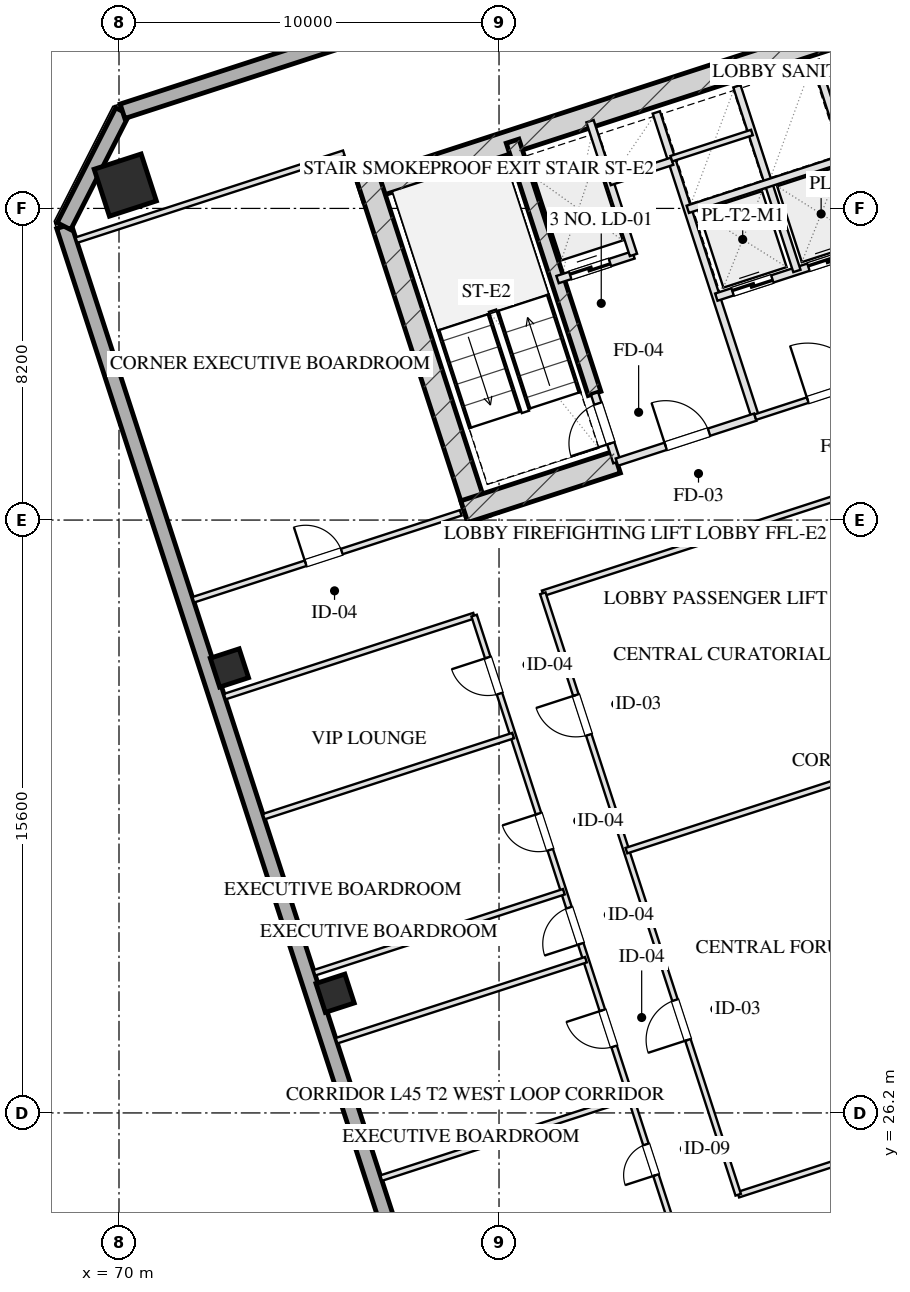
"""IFC4 building model, lengths in metres.
Left out: names, types, materials, properties, quantities, classifications, styles, units other than length and angle.
Written with IfcOpenShell. Run it as: python <this file> out.ifc"""

import sys

from ifc_helpers import new_model, si_unit, direction, frame, frame_2d, origin, origin_2d, place, context, subcontext, project, spatial, rectangle, hollow_rectangle, extrude, element, fill, save


model = new_model("IFC4")
c1 = context("Model", 3, precision=1e-05, world=origin(), true_north=direction((0.0, 1.0)))
c2 = subcontext(c1, "Body", "Model", "MODEL_VIEW")
j1 = project(units=[si_unit("LENGTHUNIT", "METRE"), si_unit("PLANEANGLEUNIT", "RADIAN")], contexts=[c1])
p1 = place(None, origin())
s1 = spatial("IfcSite", under=j1, at=p1, CompositionType="ELEMENT")
p2 = place(p1, origin())
s2 = spatial("IfcBuilding", under=s1, at=p2, CompositionType="ELEMENT")
p3 = place(p2, frame((0.0, 0.0, 170.2)))
s3 = spatial("IfcBuildingStorey", under=s2, at=p3, CompositionType="ELEMENT", Elevation=170.2)
p4 = place(p3, frame((76.344, 50.466, 0.0), z_axis=(0.0, 0.0, 1.0), x_axis=(0.951055727519, 0.309019421968, 0.0)))
e1 = element("IfcWall", 1, at=p4, inside=s3, PredefinedType="SHEAR", context=c2, shape_type="SweptSolid", body=[
    extrude(rectangle(XDim=16.4, YDim=0.6, at=frame_2d((8.2, 0.0))), origin(), (0.0, 0.0, 1.0), 3.45),
])
p5 = place(p3, frame((79.466, 41.828, 0.0), z_axis=(0.0, 0.0, 1.0), x_axis=(-0.309041232772, 0.951048640421, 0.0)))
e2 = element("IfcWall", 2, at=p5, inside=s3, PredefinedType="SHEAR", context=c2, shape_type="SweptSolid", body=[
    extrude(rectangle(XDim=9.48, YDim=0.6, at=frame_2d((4.74, 0.0))), origin(), (0.0, 0.0, 1.0), 3.45),
])
p6 = place(p3, frame((82.514, 45.131, 0.0), z_axis=(0.0, 0.0, 1.0), x_axis=(-0.308988790936, 0.951065679686, 0.0)))
e3 = element("IfcWall", 3, at=p6, inside=s3, PredefinedType="SHEAR", context=c2, shape_type="SweptSolid", body=[
    extrude(rectangle(XDim=6.98, YDim=0.35, at=frame_2d((3.49, 0.0))), origin(), (0.0, 0.0, 1.0), 3.45),
])
p7 = place(p3, frame((79.087, 42.021, 0.0), z_axis=(0.0, 0.0, 1.0), x_axis=(0.951062550203, 0.3089984233, 0.0)))
e4 = element("IfcWall", 4, at=p7, inside=s3, PredefinedType="SHEAR", context=c2, shape_type="SweptSolid", body=[
    extrude(rectangle(XDim=4.22, YDim=0.6, at=frame_2d((2.11, 0.0))), origin(), (0.0, 0.0, 1.0), 3.45),
])
p8 = place(p3, frame((70.165, 50.614, 0.0), z_axis=(0.0, 0.0, 1.0), x_axis=(0.951056516295, 0.309016994375, 0.0)))
e5 = element("IfcColumn", 5, at=p8, inside=s3, PredefinedType="COLUMN", context=c2, shape_type="SweptSolid", body=[
    extrude(hollow_rectangle(XDim=1.3, YDim=1.3, WallThickness=0.045, at=origin_2d()), origin(), (0.0, 0.0, 1.0), 3.451),
])
for number, where, z_axis, x_axis in (
    (6, (75.687, 29.349, 0.0), (0.0, 0.0, 1.0), (0.951, 0.309, 0.0)),
    (7, (72.906, 37.909, 0.0), (0.0, 0.0, 1.0), (0.951, 0.309, 0.0)),
):
    element("IfcColumn", number, at=place(p3, frame(where, z_axis=z_axis, x_axis=x_axis)), inside=s3, PredefinedType="COLUMN", context=c2, shape_type="SweptSolid", body=[
        extrude(hollow_rectangle(XDim=0.8, YDim=0.8, WallThickness=0.028, at=origin_2d()), origin(), (0.0, 0.0, 1.0), 3.451),
    ])
p9 = place(p3, frame((81.776, 8.827, 0.0), z_axis=(0.0, 0.0, 1.0), x_axis=(-0.309014228706, 0.951057414911, 0.0)))
e8 = element("IfcWall", 8, at=p9, inside=s3, PredefinedType="SOLIDWALL", context=c2, shape_type="SweptSolid", body=[
    extrude(rectangle(XDim=42.8, YDim=0.4, at=frame_2d((21.4, 0.0))), origin(), (0.0, 0.0, 1.0), 2.61),
])
p10 = place(p3, frame((68.551, 49.532, 0.0), z_axis=(0.0, 0.0, 1.0), x_axis=(0.454019523198, 0.890991735402, 0.0)))
e9 = element("IfcWall", 9, at=p10, inside=s3, PredefinedType="SOLIDWALL", context=c2, shape_type="SweptSolid", body=[
    extrude(rectangle(XDim=3.394, YDim=0.4, at=frame_2d((1.697, 0.0))), origin(), (0.0, 0.0, 1.0), 2.61),
])
p11 = place(p3, frame((70.092, 52.556, 0.0), z_axis=(0.0, 0.0, 1.0), x_axis=(0.951057580055, 0.30901372044, 0.0)))
e10 = element("IfcWall", 10, at=p11, inside=s3, PredefinedType="SOLIDWALL", context=c2, shape_type="SweptSolid", body=[
    extrude(rectangle(XDim=26.4, YDim=0.4, at=frame_2d((13.2, 0.0))), origin(), (0.0, 0.0, 1.0), 2.61),
])
p12 = place(p3, frame((83.101, 43.324, 0.0), z_axis=(0.0, 0.0, 1.0), x_axis=(-0.309048298632, 0.951046344356, 0.0)))
e11 = element("IfcWall", 11, at=p12, inside=s3, PredefinedType="PARTITIONING", context=c2, shape_type="SweptSolid", body=[
    extrude(rectangle(XDim=1.9, YDim=0.2, at=frame_2d((0.95, 0.0))), origin(), (0.0, 0.0, 1.0), 3.175),
])
p13 = place(p12, frame((0.52, 0.0, 0.0)))
e12 = element("IfcOpeningElement", 12, at=p13, cuts=e11, PredefinedType="OPENING", context=c2, shape_type="SweptSolid", body=[
    extrude(rectangle(XDim=1.1, YDim=2.05, at=frame_2d((0.55, 1.025))), frame((0.0, 0.11, 0.0), z_axis=(0.0, -1.0, 0.0), x_axis=(1.0, 0.0, 0.0)), (0.0, 0.0, 1.0), 0.22),
])
p14 = place(p3, frame((86.743, 44.508, 0.0), z_axis=(0.0, 0.0, 1.0), x_axis=(-0.309016001439, 0.951056838919, 0.0)))
e13 = element("IfcWall", 13, at=p14, inside=s3, PredefinedType="PARTITIONING", context=c2, shape_type="SweptSolid", body=[
    extrude(rectangle(XDim=8.43, YDim=0.2, at=frame_2d((4.215, 0.0))), origin(), (0.0, 0.0, 1.0), 3.175),
])
p15 = place(p3, frame((83.101, 43.324, 0.0), z_axis=(0.0, 0.0, 1.0), x_axis=(0.951052804469, 0.309028417967, 0.0)))
e14 = element("IfcWall", 14, at=p15, inside=s3, PredefinedType="PARTITIONING", context=c2, shape_type="SweptSolid", body=[
    extrude(rectangle(XDim=3.83, YDim=0.2, at=frame_2d((1.915, 0.0))), origin(), (0.0, 0.0, 1.0), 3.175),
])
p16 = place(p15, frame((1.35, 0.0, 0.0)))
e15 = element("IfcOpeningElement", 15, at=p16, cuts=e14, PredefinedType="OPENING", context=c2, shape_type="SweptSolid", body=[
    extrude(rectangle(XDim=1.2, YDim=2.05, at=frame_2d((0.6, 1.025))), frame((0.0, 0.11, 0.0), z_axis=(0.0, -1.0, 0.0), x_axis=(1.0, 0.0, 0.0)), (0.0, 0.0, 1.0), 0.22),
])
p17 = place(p3, frame((81.54, 48.127, 0.0), z_axis=(0.0, 0.0, 1.0), x_axis=(0.951062257173, 0.308999325213, 0.0)))
e16 = element("IfcWall", 16, at=p17, inside=s3, PredefinedType="PARTITIONING", context=c2, shape_type="SweptSolid", body=[
    extrude(rectangle(XDim=2.1, YDim=0.2, at=frame_2d((1.05, 0.0))), origin(), (0.0, 0.0, 1.0), 3.175),
])
p18 = place(p17, frame((0.35, 0.0, 0.0)))
e17 = element("IfcOpeningElement", 17, at=p18, cuts=e16, PredefinedType="OPENING", context=c2, shape_type="SweptSolid", body=[
    extrude(rectangle(XDim=1.1, YDim=2.05, at=frame_2d((0.55, 1.025))), frame((0.0, 0.11, 0.0), z_axis=(0.0, -1.0, 0.0), x_axis=(1.0, 0.0, 0.0)), (0.0, 0.0, 1.0), 0.22),
])
p19 = place(p3, frame((83.538, 48.776, 0.0), z_axis=(0.0, 0.0, 1.0), x_axis=(-0.3089935693, 0.951064127245, 0.0)))
e18 = element("IfcWall", 18, at=p19, inside=s3, PredefinedType="PARTITIONING", context=c2, shape_type="SweptSolid", body=[
    extrude(rectangle(XDim=3.7, YDim=0.2, at=frame_2d((1.85, 0.0))), origin(), (0.0, 0.0, 1.0), 3.175),
])
p20 = place(p3, frame((82.91, 50.707, 0.0), z_axis=(0.0, 0.0, 1.0), x_axis=(0.951041328149, 0.309063734775, 0.0)))
e19 = element("IfcWall", 19, at=p20, inside=s3, PredefinedType="PARTITIONING", context=c2, shape_type="SweptSolid", body=[
    extrude(rectangle(XDim=1.73, YDim=0.2, at=frame_2d((0.865, 0.0))), origin(), (0.0, 0.0, 1.0), 3.175),
])
p21 = place(p3, frame((90.928, 45.868, 0.0), z_axis=(0.0, 0.0, 1.0), x_axis=(-0.309042196757, 0.951048327176, 0.0)))
e20 = element("IfcWall", 20, at=p21, inside=s3, PredefinedType="PARTITIONING", context=c2, shape_type="SweptSolid", body=[
    extrude(rectangle(XDim=8.43, YDim=0.2, at=frame_2d((4.215, 0.0))), origin(), (0.0, 0.0, 1.0), 3.175),
])
p22 = place(p3, frame((86.743, 44.508, 0.0), z_axis=(0.0, 0.0, 1.0), x_axis=(0.951063829732, 0.308994485023, 0.0)))
e21 = element("IfcWall", 21, at=p22, inside=s3, PredefinedType="PARTITIONING", context=c2, shape_type="SweptSolid", body=[
    extrude(rectangle(XDim=4.4, YDim=0.15, at=frame_2d((2.2, 0.0))), origin(), (0.0, 0.0, 1.0), 3.175),
])
p23 = place(p22, frame((1.45, 0.0, 0.0)))
e22 = element("IfcOpeningElement", 22, at=p23, cuts=e21, PredefinedType="OPENING", context=c2, shape_type="SweptSolid", body=[
    extrude(rectangle(XDim=1.5, YDim=2.05, at=frame_2d((0.75, 1.025))), frame((0.0, 0.085, 0.0), z_axis=(0.0, -1.0, 0.0), x_axis=(1.0, 0.0, 0.0)), (0.0, 0.0, 1.0), 0.17),
])
p24 = place(p3, frame((85.718, 47.666, 0.0), z_axis=(0.0, 0.0, 1.0), x_axis=(0.951058531764, 0.30901079133, 0.0)))
e23 = element("IfcWall", 23, at=p24, inside=s3, PredefinedType="PARTITIONING", context=c2, shape_type="SweptSolid", body=[
    extrude(rectangle(XDim=4.4, YDim=0.2, at=frame_2d((2.2, 0.0))), origin(), (0.0, 0.0, 1.0), 3.175),
])
p25 = place(p24, frame((0.45, 0.0, 0.0)))
e24 = element("IfcOpeningElement", 24, at=p25, cuts=e23, PredefinedType="OPENING", context=c2, shape_type="SweptSolid", body=[
    extrude(rectangle(XDim=1.1, YDim=2.05, at=frame_2d((0.55, 1.025))), frame((0.0, 0.11, 0.0), z_axis=(0.0, -1.0, 0.0), x_axis=(1.0, 0.0, 0.0)), (0.0, 0.0, 1.0), 0.22),
])
p26 = place(p24, frame((2.55, 0.0, 0.0)))
e25 = element("IfcOpeningElement", 25, at=p26, cuts=e23, PredefinedType="OPENING", context=c2, shape_type="SweptSolid", body=[
    extrude(rectangle(XDim=1.1, YDim=2.05, at=frame_2d((0.55, 1.025))), frame((0.0, 0.11, 0.0), z_axis=(0.0, -1.0, 0.0), x_axis=(1.0, 0.0, 0.0)), (0.0, 0.0, 1.0), 0.22),
])
p27 = place(p3, frame((87.838, 48.354, 0.0), z_axis=(0.0, 0.0, 1.0), x_axis=(-0.3090093719, 0.951058992953, 0.0)))
e26 = element("IfcWall", 26, at=p27, inside=s3, PredefinedType="PARTITIONING", context=c2, shape_type="SweptSolid", body=[
    extrude(rectangle(XDim=5.11, YDim=0.2, at=frame_2d((2.555, 0.0))), origin(), (0.0, 0.0, 1.0), 3.175),
])
p28 = place(p3, frame((84.967, 49.977, 0.0), z_axis=(0.0, 0.0, 1.0), x_axis=(0.951063829732, 0.308994485023, 0.0)))
e27 = element("IfcWall", 27, at=p28, inside=s3, PredefinedType="PARTITIONING", context=c2, shape_type="SweptSolid", body=[
    extrude(rectangle(XDim=4.4, YDim=0.2, at=frame_2d((2.2, 0.0))), origin(), (0.0, 0.0, 1.0), 3.175),
])
p29 = place(p3, frame((84.534, 51.308, 0.0), z_axis=(0.0, 0.0, 1.0), x_axis=(0.951075093106, 0.308959814982, 0.0)))
e28 = element("IfcWall", 28, at=p29, inside=s3, PredefinedType="PARTITIONING", context=c2, shape_type="SweptSolid", body=[
    extrude(rectangle(XDim=2.23, YDim=0.15, at=frame_2d((1.115, 0.0))), origin(), (0.0, 0.0, 1.0), 3.175),
])
p30 = place(p3, frame((68.88, 49.166, 0.0), z_axis=(0.0, 0.0, 1.0), x_axis=(0.951060977215, 0.309003264738, 0.0)))
e29 = element("IfcWall", 29, at=p30, inside=s3, PredefinedType="PARTITIONING", context=c2, shape_type="SweptSolid", body=[
    extrude(rectangle(XDim=7.4, YDim=0.15, at=frame_2d((3.7, 0.0))), origin(), (0.0, 0.0, 1.0), 3.175),
])
p31 = place(p3, frame((71.955, 39.703, 0.0), z_axis=(0.0, 0.0, 1.0), x_axis=(0.951060977215, 0.309003264738, 0.0)))
e30 = element("IfcWall", 30, at=p31, inside=s3, PredefinedType="PARTITIONING", context=c2, shape_type="SweptSolid", body=[
    extrude(rectangle(XDim=7.4, YDim=0.15, at=frame_2d((3.7, 0.0))), origin(), (0.0, 0.0, 1.0), 3.175),
])
p32 = place(p31, frame((3.108, 0.0, 0.0)))
e31 = element("IfcOpeningElement", 31, at=p32, cuts=e30, PredefinedType="OPENING", context=c2, shape_type="SweptSolid", body=[
    extrude(rectangle(XDim=1.0, YDim=2.05, at=frame_2d((0.5, 1.025))), frame((0.0, 0.085, 0.0), z_axis=(0.0, -1.0, 0.0), x_axis=(1.0, 0.0, 0.0)), (0.0, 0.0, 1.0), 0.17),
])
p33 = place(p3, frame((86.294, 24.048, 0.0), z_axis=(0.0, 0.0, 1.0), x_axis=(0.951052008164, 0.309030868631, 0.0)))
e32 = element("IfcWall", 32, at=p33, inside=s3, PredefinedType="PARTITIONING", context=c2, shape_type="SweptSolid", body=[
    extrude(rectangle(XDim=8.6, YDim=0.15, at=frame_2d((4.3, 0.0))), origin(), (0.0, 0.0, 1.0), 3.175),
])
p34 = place(p3, frame((72.783, 37.154, 0.0), z_axis=(0.0, 0.0, 1.0), x_axis=(0.951051488548, 0.309032467762, 0.0)))
e33 = element("IfcWall", 33, at=p34, inside=s3, PredefinedType="PARTITIONING", context=c2, shape_type="SweptSolid", body=[
    extrude(rectangle(XDim=6.9, YDim=0.15, at=frame_2d((3.45, 0.0))), origin(), (0.0, 0.0, 1.0), 3.175),
])
p35 = place(p3, frame((81.152, 39.873, 0.0), z_axis=(0.0, 0.0, 1.0), x_axis=(0.951057640494, 0.309013534425, 0.0)))
e34 = element("IfcWall", 34, at=p35, inside=s3, PredefinedType="PARTITIONING", context=c2, shape_type="SweptSolid", body=[
    extrude(rectangle(XDim=8.6, YDim=0.15, at=frame_2d((4.3, 0.0))), origin(), (0.0, 0.0, 1.0), 3.175),
])
p36 = place(p3, frame((84.487, 23.46, 0.0), z_axis=(0.0, 0.0, 1.0), x_axis=(-0.30901773025, 0.951056277195, 0.0)))
e35 = element("IfcWall", 35, at=p36, inside=s3, PredefinedType="PARTITIONING", context=c2, shape_type="SweptSolid", body=[
    extrude(rectangle(XDim=16.64, YDim=0.15, at=frame_2d((8.32, 0.0))), origin(), (0.0, 0.0, 1.0), 3.175),
])
p37 = place(p36, frame((1.16, 0.0, 0.0)))
e36 = element("IfcOpeningElement", 36, at=p37, cuts=e35, PredefinedType="OPENING", context=c2, shape_type="SweptSolid", body=[
    extrude(rectangle(XDim=0.85, YDim=2.05, at=frame_2d((0.425, 1.025))), frame((0.0, 0.085, 0.0), z_axis=(0.0, -1.0, 0.0), x_axis=(1.0, 0.0, 0.0)), (0.0, 0.0, 1.0), 0.17),
])
p38 = place(p36, frame((4.72, 0.0, 0.0)))
e37 = element("IfcOpeningElement", 37, at=p38, cuts=e35, PredefinedType="OPENING", context=c2, shape_type="SweptSolid", body=[
    extrude(rectangle(XDim=1.0, YDim=2.05, at=frame_2d((0.5, 1.025))), frame((0.0, 0.085, 0.0), z_axis=(0.0, -1.0, 0.0), x_axis=(1.0, 0.0, 0.0)), (0.0, 0.0, 1.0), 0.17),
])
p39 = place(p36, frame((7.56, 0.0, 0.0)))
e38 = element("IfcOpeningElement", 38, at=p39, cuts=e35, PredefinedType="OPENING", context=c2, shape_type="SweptSolid", body=[
    extrude(rectangle(XDim=1.0, YDim=2.05, at=frame_2d((0.5, 1.025))), frame((0.0, 0.085, 0.0), z_axis=(0.0, -1.0, 0.0), x_axis=(1.0, 0.0, 0.0)), (0.0, 0.0, 1.0), 0.17),
])
p40 = place(p36, frame((10.16, 0.0, 0.0)))
e39 = element("IfcOpeningElement", 39, at=p40, cuts=e35, PredefinedType="OPENING", context=c2, shape_type="SweptSolid", body=[
    extrude(rectangle(XDim=1.0, YDim=2.05, at=frame_2d((0.5, 1.025))), frame((0.0, 0.085, 0.0), z_axis=(0.0, -1.0, 0.0), x_axis=(1.0, 0.0, 0.0)), (0.0, 0.0, 1.0), 0.17),
])
p41 = place(p36, frame((14.48, 0.0, 0.0)))
e40 = element("IfcOpeningElement", 40, at=p41, cuts=e35, PredefinedType="OPENING", context=c2, shape_type="SweptSolid", body=[
    extrude(rectangle(XDim=1.0, YDim=2.05, at=frame_2d((0.5, 1.025))), frame((0.0, 0.085, 0.0), z_axis=(0.0, -1.0, 0.0), x_axis=(1.0, 0.0, 0.0)), (0.0, 0.0, 1.0), 0.17),
])
p42 = place(p3, frame((86.294, 24.048, 0.0), z_axis=(0.0, 0.0, 1.0), x_axis=(-0.309004459387, 0.951060589068, 0.0)))
e41 = element("IfcWall", 41, at=p42, inside=s3, PredefinedType="PARTITIONING", context=c2, shape_type="SweptSolid", body=[
    extrude(rectangle(XDim=16.64, YDim=0.15, at=frame_2d((8.32, 0.0))), origin(), (0.0, 0.0, 1.0), 3.175),
])
p43 = place(p42, frame((4.284, 0.0, 0.0)))
e42 = element("IfcOpeningElement", 42, at=p43, cuts=e41, PredefinedType="OPENING", context=c2, shape_type="SweptSolid", body=[
    extrude(rectangle(XDim=1.1, YDim=2.05, at=frame_2d((0.55, 1.025))), frame((0.0, 0.085, 0.0), z_axis=(0.0, -1.0, 0.0), x_axis=(1.0, 0.0, 0.0)), (0.0, 0.0, 1.0), 0.17),
])
p44 = place(p42, frame((12.724, 0.0, 0.0)))
e43 = element("IfcOpeningElement", 43, at=p44, cuts=e41, PredefinedType="OPENING", context=c2, shape_type="SweptSolid", body=[
    extrude(rectangle(XDim=1.1, YDim=2.05, at=frame_2d((0.55, 1.025))), frame((0.0, 0.085, 0.0), z_axis=(0.0, -1.0, 0.0), x_axis=(1.0, 0.0, 0.0)), (0.0, 0.0, 1.0), 0.17),
])
p45 = place(p3, frame((83.352, 33.102, 0.0), z_axis=(0.0, 0.0, 1.0), x_axis=(0.951057640494, 0.309013534425, 0.0)))
e44 = element("IfcWall", 44, at=p45, inside=s3, PredefinedType="PARTITIONING", context=c2, shape_type="SweptSolid", body=[
    extrude(rectangle(XDim=8.6, YDim=0.15, at=frame_2d((4.3, 0.0))), origin(), (0.0, 0.0, 1.0), 3.175),
])
for number, where, z_axis, x_axis in (
    (45, (76.899, 24.486, 0.0), (0.0, 0.0, 1.0), (0.951, 0.309, 0.0)),
    (46, (75.725, 28.1, 0.0), (0.0, 0.0, 1.0), (0.951, 0.309, 0.0)),
    (47, (75.144, 29.888, 0.0), (0.0, 0.0, 1.0), (0.951, 0.309, 0.0)),
    (48, (73.809, 33.996, 0.0), (0.0, 0.0, 1.0), (0.951, 0.309, 0.0)),
):
    element("IfcWall", number, at=place(p3, frame(where, z_axis=z_axis, x_axis=x_axis)), inside=s3, PredefinedType="PARTITIONING", context=c2, shape_type="SweptSolid", body=[
        extrude(rectangle(XDim=6.9, YDim=0.15, at=frame_2d((3.45, 0.0))), origin(), (0.0, 0.0, 1.0), 3.175),
    ])
p46 = place(p13, origin())
e49 = element("IfcDoor", 49, at=p46, inside=s3, OperationType="SINGLE_SWING_LEFT", PredefinedType="DOOR", context=c2, shape_type="SweptSolid", body=[
    extrude(rectangle(XDim=1.1, YDim=2.05, at=frame_2d((0.55, 1.025))), frame((0.0, 0.025, 0.0), z_axis=(0.0, -1.0, 0.0), x_axis=(1.0, 0.0, 0.0)), (0.0, 0.0, 1.0), 0.05),
])
fill(e12, e49)
p47 = place(p16, origin())
e50 = element("IfcDoor", 50, at=p47, inside=s3, OperationType="SINGLE_SWING_LEFT", PredefinedType="DOOR", context=c2, shape_type="SweptSolid", body=[
    extrude(rectangle(XDim=1.2, YDim=2.05, at=frame_2d((0.6, 1.025))), frame((0.0, 0.025, 0.0), z_axis=(0.0, -1.0, 0.0), x_axis=(1.0, 0.0, 0.0)), (0.0, 0.0, 1.0), 0.05),
])
fill(e15, e50)
p48 = place(p18, origin())
e51 = element("IfcDoor", 51, at=p48, inside=s3, OperationType="DOUBLE_DOOR_SLIDING", PredefinedType="DOOR", context=c2, shape_type="SweptSolid", body=[
    extrude(rectangle(XDim=1.1, YDim=2.05, at=frame_2d((0.55, 1.025))), frame((0.0, 0.025, 0.0), z_axis=(0.0, -1.0, 0.0), x_axis=(1.0, 0.0, 0.0)), (0.0, 0.0, 1.0), 0.05),
])
fill(e17, e51)
p49 = place(p23, origin())
e52 = element("IfcDoor", 52, at=p49, inside=s3, OperationType="SINGLE_SWING_LEFT", PredefinedType="DOOR", context=c2, shape_type="SweptSolid", body=[
    extrude(rectangle(XDim=1.5, YDim=2.05, at=frame_2d((0.75, 1.025))), frame((0.0, 0.025, 0.0), z_axis=(0.0, -1.0, 0.0), x_axis=(1.0, 0.0, 0.0)), (0.0, 0.0, 1.0), 0.05),
])
fill(e22, e52)
p50 = place(p25, origin())
e53 = element("IfcDoor", 53, at=p50, inside=s3, OperationType="DOUBLE_DOOR_SLIDING", PredefinedType="DOOR", context=c2, shape_type="SweptSolid", body=[
    extrude(rectangle(XDim=1.1, YDim=2.05, at=frame_2d((0.55, 1.025))), frame((0.0, 0.025, 0.0), z_axis=(0.0, -1.0, 0.0), x_axis=(1.0, 0.0, 0.0)), (0.0, 0.0, 1.0), 0.05),
])
fill(e24, e53)
p51 = place(p26, origin())
e54 = element("IfcDoor", 54, at=p51, inside=s3, OperationType="DOUBLE_DOOR_SLIDING", PredefinedType="DOOR", context=c2, shape_type="SweptSolid", body=[
    extrude(rectangle(XDim=1.1, YDim=2.05, at=frame_2d((0.55, 1.025))), frame((0.0, 0.025, 0.0), z_axis=(0.0, -1.0, 0.0), x_axis=(1.0, 0.0, 0.0)), (0.0, 0.0, 1.0), 0.05),
])
fill(e25, e54)
p52 = place(p32, origin())
e55 = element("IfcDoor", 55, at=p52, inside=s3, OperationType="SINGLE_SWING_LEFT", PredefinedType="DOOR", context=c2, shape_type="SweptSolid", body=[
    extrude(rectangle(XDim=1.0, YDim=2.05, at=frame_2d((0.5, 1.025))), frame((0.0, 0.025, 0.0), z_axis=(0.0, -1.0, 0.0), x_axis=(1.0, 0.0, 0.0)), (0.0, 0.0, 1.0), 0.05),
])
fill(e31, e55)
p53 = place(p37, origin())
e56 = element("IfcDoor", 56, at=p53, inside=s3, OperationType="SINGLE_SWING_LEFT", PredefinedType="DOOR", context=c2, shape_type="SweptSolid", body=[
    extrude(rectangle(XDim=0.85, YDim=2.05, at=frame_2d((0.425, 1.025))), frame((0.0, 0.025, 0.0), z_axis=(0.0, -1.0, 0.0), x_axis=(1.0, 0.0, 0.0)), (0.0, 0.0, 1.0), 0.05),
])
fill(e36, e56)
p54 = place(p38, origin())
e57 = element("IfcDoor", 57, at=p54, inside=s3, OperationType="SINGLE_SWING_RIGHT", PredefinedType="DOOR", context=c2, shape_type="SweptSolid", body=[
    extrude(rectangle(XDim=1.0, YDim=2.05, at=frame_2d((0.5, 1.025))), frame((0.0, 0.025, 0.0), z_axis=(0.0, -1.0, 0.0), x_axis=(1.0, 0.0, 0.0)), (0.0, 0.0, 1.0), 0.05),
])
fill(e37, e57)
p55 = place(p39, origin())
e58 = element("IfcDoor", 58, at=p55, inside=s3, OperationType="SINGLE_SWING_LEFT", PredefinedType="DOOR", context=c2, shape_type="SweptSolid", body=[
    extrude(rectangle(XDim=1.0, YDim=2.05, at=frame_2d((0.5, 1.025))), frame((0.0, 0.025, 0.0), z_axis=(0.0, -1.0, 0.0), x_axis=(1.0, 0.0, 0.0)), (0.0, 0.0, 1.0), 0.05),
])
fill(e38, e58)
p56 = place(p40, origin())
e59 = element("IfcDoor", 59, at=p56, inside=s3, OperationType="SINGLE_SWING_RIGHT", PredefinedType="DOOR", context=c2, shape_type="SweptSolid", body=[
    extrude(rectangle(XDim=1.0, YDim=2.05, at=frame_2d((0.5, 1.025))), frame((0.0, 0.025, 0.0), z_axis=(0.0, -1.0, 0.0), x_axis=(1.0, 0.0, 0.0)), (0.0, 0.0, 1.0), 0.05),
])
fill(e39, e59)
p57 = place(p41, origin())
e60 = element("IfcDoor", 60, at=p57, inside=s3, OperationType="SINGLE_SWING_RIGHT", PredefinedType="DOOR", context=c2, shape_type="SweptSolid", body=[
    extrude(rectangle(XDim=1.0, YDim=2.05, at=frame_2d((0.5, 1.025))), frame((0.0, 0.025, 0.0), z_axis=(0.0, -1.0, 0.0), x_axis=(1.0, 0.0, 0.0)), (0.0, 0.0, 1.0), 0.05),
])
fill(e40, e60)
p58 = place(p43, origin())
e61 = element("IfcDoor", 61, at=p58, inside=s3, OperationType="SINGLE_SWING_LEFT", PredefinedType="DOOR", context=c2, shape_type="SweptSolid", body=[
    extrude(rectangle(XDim=1.1, YDim=2.05, at=frame_2d((0.55, 1.025))), frame((0.0, 0.025, 0.0), z_axis=(0.0, -1.0, 0.0), x_axis=(1.0, 0.0, 0.0)), (0.0, 0.0, 1.0), 0.05),
])
fill(e42, e61)
p59 = place(p44, origin())
e62 = element("IfcDoor", 62, at=p59, inside=s3, OperationType="SINGLE_SWING_RIGHT", PredefinedType="DOOR", context=c2, shape_type="SweptSolid", body=[
    extrude(rectangle(XDim=1.1, YDim=2.05, at=frame_2d((0.55, 1.025))), frame((0.0, 0.025, 0.0), z_axis=(0.0, -1.0, 0.0), x_axis=(1.0, 0.0, 0.0)), (0.0, 0.0, 1.0), 0.05),
])
fill(e43, e62)
save(model, sys.argv[1])
